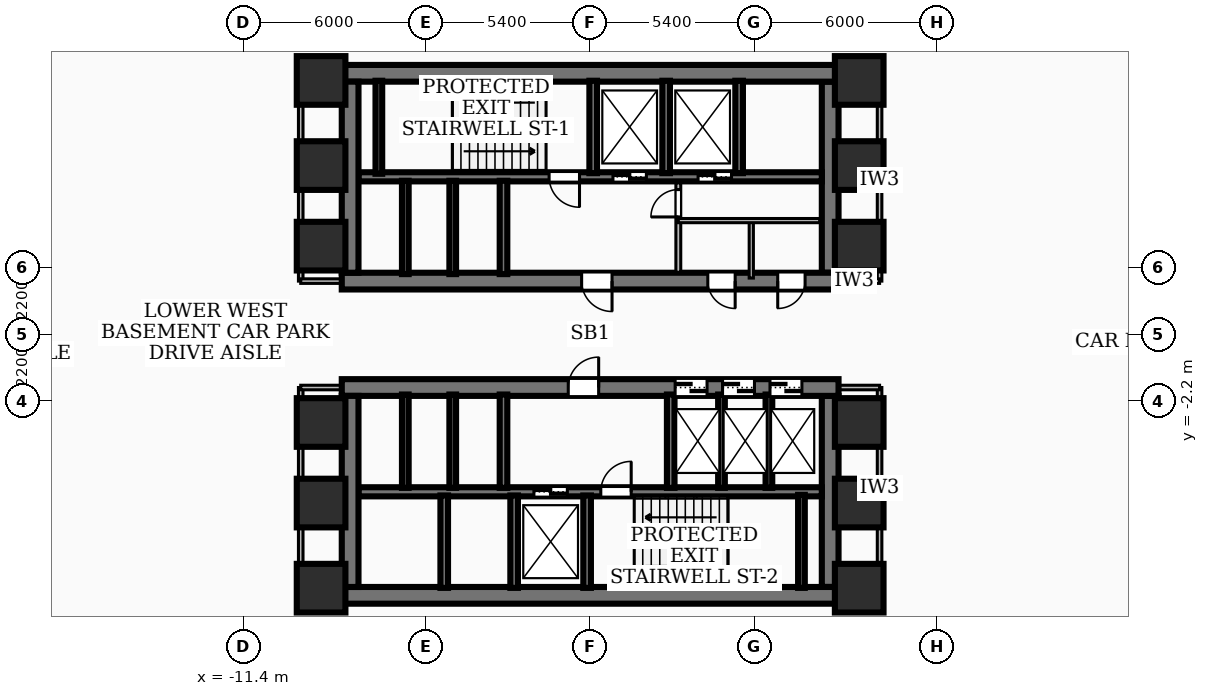
"""IFC4 building model, lengths in metres.
Left out: names, types, materials, properties, quantities, classifications, styles, units other than length and angle.
Written with IfcOpenShell. Run it as: python <this file> out.ifc"""

import sys

from ifc_helpers import new_model, si_unit, direction, frame, frame_2d, origin, origin_2d, place, context, subcontext, project, spatial, rectangle, extrude, element, fill, save


model = new_model("IFC4")
c1 = context("Model", 3, precision=1e-05, world=origin(), true_north=direction((0.0, 1.0)))
c2 = subcontext(c1, "Body", "Model", "MODEL_VIEW")
j1 = project(units=[si_unit("LENGTHUNIT", "METRE"), si_unit("PLANEANGLEUNIT", "RADIAN")], contexts=[c1])
p1 = place(None, origin())
s1 = spatial("IfcSite", under=j1, at=p1, CompositionType="ELEMENT")
p2 = place(p1, origin())
s2 = spatial("IfcBuilding", under=s1, at=p2, CompositionType="ELEMENT")
p3 = place(p2, frame((0.0, 0.0, -9.0)))
s3 = spatial("IfcBuildingStorey", under=s2, at=p3, CompositionType="ELEMENT", Elevation=-9.0)
p4 = place(p3, frame((-8.78, 8.585, 0.0), z_axis=(0.0, 0.0, 1.0), x_axis=(1.0, 0.0, 0.0)))
e1 = element("IfcWall", 1, at=p4, inside=s3, PredefinedType="SHEAR", context=c2, shape_type="SweptSolid", body=[
    extrude(rectangle(XDim=17.56, YDim=0.55, at=frame_2d((8.78, 0.0))), origin(), (0.0, 0.0, 1.0), 4.18),
])
p5 = place(p3, frame((8.17, 1.75, 0.0), z_axis=(0.0, 0.0, 1.0), x_axis=(-1.0, 0.0, 0.0)))
e2 = element("IfcWall", 2, at=p5, inside=s3, PredefinedType="SHEAR", context=c2, shape_type="SweptSolid", body=[
    extrude(rectangle(XDim=16.34, YDim=0.55, at=frame_2d((8.17, 0.0))), origin(), (0.0, 0.0, 1.0), 4.18),
])
p6 = place(p5, frame((7.45, 0.0, 0.0)))
e3 = element("IfcOpeningElement", 3, at=p6, cuts=e2, PredefinedType="OPENING", context=c2, shape_type="SweptSolid", body=[
    extrude(rectangle(XDim=1.0, YDim=2.1, at=frame_2d((0.5, 1.05))), frame((0.0, 0.285, 0.0), z_axis=(0.0, -1.0, 0.0), x_axis=(1.0, 0.0, 0.0)), (0.0, 0.0, 1.0), 0.57),
])
p7 = place(p5, frame((3.4, 0.0, 0.0)))
e4 = element("IfcOpeningElement", 4, at=p7, cuts=e2, PredefinedType="OPENING", context=c2, shape_type="SweptSolid", body=[
    extrude(rectangle(XDim=0.9, YDim=2.06, at=frame_2d((0.45, 1.03))), frame((0.0, 0.285, 0.0), z_axis=(0.0, -1.0, 0.0), x_axis=(1.0, 0.0, 0.0)), (0.0, 0.0, 1.0), 0.57),
])
p8 = place(p5, frame((1.1, 0.0, 0.0)))
e5 = element("IfcOpeningElement", 5, at=p8, cuts=e2, PredefinedType="OPENING", context=c2, shape_type="SweptSolid", body=[
    extrude(rectangle(XDim=0.9, YDim=2.06, at=frame_2d((0.45, 1.03))), frame((0.0, 0.285, 0.0), z_axis=(0.0, -1.0, 0.0), x_axis=(1.0, 0.0, 0.0)), (0.0, 0.0, 1.0), 0.57),
])
for number, where, z_axis, x_axis in (
    (6, (-7.895, 2.025, 0.0), (0.0, 0.0, 1.0), (0.0, 1.0, 0.0)),
    (7, (7.895, 8.31, 0.0), (0.0, 0.0, 1.0), (0.0, -1.0, 0.0)),
):
    element("IfcWall", number, at=place(p3, frame(where, z_axis=z_axis, x_axis=x_axis)), inside=s3, PredefinedType="SHEAR", context=c2, shape_type="SweptSolid", body=[
        extrude(rectangle(XDim=6.285, YDim=0.55, at=frame_2d((3.143, 0.0))), origin(), (0.0, 0.0, 1.0), 4.18),
    ])
p9 = place(p3, frame((7.62, 5.18, 0.0), z_axis=(0.0, 0.0, 1.0), x_axis=(-1.0, 0.0, 0.0)))
e8 = element("IfcWall", 8, at=p9, inside=s3, PredefinedType="SOLIDWALL", context=c2, shape_type="SweptSolid", body=[
    extrude(rectangle(XDim=15.24, YDim=0.3, at=frame_2d((7.62, 0.0))), origin(), (0.0, 0.0, 1.0), 4.18),
])
p10 = place(p9, frame((5.77, 0.0, 0.0)))
e9 = element("IfcOpeningElement", 9, at=p10, cuts=e8, PredefinedType="OPENING", context=c2, shape_type="SweptSolid", body=[
    extrude(rectangle(XDim=1.1, YDim=2.15, at=frame_2d((0.55, 1.075))), frame((0.0, 0.16, 0.0), z_axis=(0.0, -1.0, 0.0), x_axis=(1.0, 0.0, 0.0)), (0.0, 0.0, 1.0), 0.32),
])
p11 = place(p9, frame((2.97, 0.0, 0.0)))
e10 = element("IfcOpeningElement", 10, at=p11, cuts=e8, PredefinedType="OPENING", context=c2, shape_type="SweptSolid", body=[
    extrude(rectangle(XDim=1.1, YDim=2.15, at=frame_2d((0.55, 1.075))), frame((0.0, 0.16, 0.0), z_axis=(0.0, -1.0, 0.0), x_axis=(1.0, 0.0, 0.0)), (0.0, 0.0, 1.0), 0.32),
])
p12 = place(p9, frame((7.97, 0.0, 0.0)))
e11 = element("IfcOpeningElement", 11, at=p12, cuts=e8, PredefinedType="OPENING", context=c2, shape_type="SweptSolid", body=[
    extrude(rectangle(XDim=1.0, YDim=2.1, at=frame_2d((0.5, 1.05))), frame((0.0, 0.16, 0.0), z_axis=(0.0, -1.0, 0.0), x_axis=(1.0, 0.0, 0.0)), (0.0, 0.0, 1.0), 0.32),
])
p13 = place(p3, frame((8.78, -8.585, 0.0), z_axis=(0.0, 0.0, 1.0), x_axis=(-1.0, 0.0, 0.0)))
e12 = element("IfcWall", 12, at=p13, inside=s3, PredefinedType="SHEAR", context=c2, shape_type="SweptSolid", body=[
    extrude(rectangle(XDim=17.56, YDim=0.55, at=frame_2d((8.78, 0.0))), origin(), (0.0, 0.0, 1.0), 4.18),
])
p14 = place(p3, frame((-8.17, -1.75, 0.0), z_axis=(0.0, 0.0, 1.0), x_axis=(1.0, 0.0, 0.0)))
e13 = element("IfcWall", 13, at=p14, inside=s3, PredefinedType="SHEAR", context=c2, shape_type="SweptSolid", body=[
    extrude(rectangle(XDim=16.34, YDim=0.55, at=frame_2d((8.17, 0.0))), origin(), (0.0, 0.0, 1.0), 4.18),
])
p15 = place(p14, frame((7.45, 0.0, 0.0)))
e14 = element("IfcOpeningElement", 14, at=p15, cuts=e13, PredefinedType="OPENING", context=c2, shape_type="SweptSolid", body=[
    extrude(rectangle(XDim=1.0, YDim=2.1, at=frame_2d((0.5, 1.05))), frame((0.0, 0.285, 0.0), z_axis=(0.0, -1.0, 0.0), x_axis=(1.0, 0.0, 0.0)), (0.0, 0.0, 1.0), 0.57),
])
p16 = place(p14, frame((10.965, 0.0, 0.0)))
e15 = element("IfcOpeningElement", 15, at=p16, cuts=e13, PredefinedType="OPENING", context=c2, shape_type="SweptSolid", body=[
    extrude(rectangle(XDim=1.05, YDim=2.15, at=frame_2d((0.525, 1.075))), frame((0.0, 0.285, 0.0), z_axis=(0.0, -1.0, 0.0), x_axis=(1.0, 0.0, 0.0)), (0.0, 0.0, 1.0), 0.57),
])
p17 = place(p14, frame((12.525, 0.0, 0.0)))
e16 = element("IfcOpeningElement", 16, at=p17, cuts=e13, PredefinedType="OPENING", context=c2, shape_type="SweptSolid", body=[
    extrude(rectangle(XDim=1.05, YDim=2.15, at=frame_2d((0.525, 1.075))), frame((0.0, 0.285, 0.0), z_axis=(0.0, -1.0, 0.0), x_axis=(1.0, 0.0, 0.0)), (0.0, 0.0, 1.0), 0.57),
])
p18 = place(p14, frame((14.085, 0.0, 0.0)))
e17 = element("IfcOpeningElement", 17, at=p18, cuts=e13, PredefinedType="OPENING", context=c2, shape_type="SweptSolid", body=[
    extrude(rectangle(XDim=1.05, YDim=2.15, at=frame_2d((0.525, 1.075))), frame((0.0, 0.285, 0.0), z_axis=(0.0, -1.0, 0.0), x_axis=(1.0, 0.0, 0.0)), (0.0, 0.0, 1.0), 0.57),
])
for number, where, z_axis, x_axis in (
    (18, (-7.895, -8.31, 0.0), (0.0, 0.0, 1.0), (0.0, 1.0, 0.0)),
    (19, (7.895, -2.025, 0.0), (0.0, 0.0, 1.0), (0.0, -1.0, 0.0)),
):
    element("IfcWall", number, at=place(p3, frame(where, z_axis=z_axis, x_axis=x_axis)), inside=s3, PredefinedType="SHEAR", context=c2, shape_type="SweptSolid", body=[
        extrude(rectangle(XDim=6.285, YDim=0.55, at=frame_2d((3.143, 0.0))), origin(), (0.0, 0.0, 1.0), 4.18),
    ])
p19 = place(p3, frame((-7.62, -5.18, 0.0), z_axis=(0.0, 0.0, 1.0), x_axis=(1.0, 0.0, 0.0)))
e20 = element("IfcWall", 20, at=p19, inside=s3, PredefinedType="SOLIDWALL", context=c2, shape_type="SweptSolid", body=[
    extrude(rectangle(XDim=15.24, YDim=0.3, at=frame_2d((7.62, 0.0))), origin(), (0.0, 0.0, 1.0), 4.18),
])
p20 = place(p19, frame((5.77, 0.0, 0.0)))
e21 = element("IfcOpeningElement", 21, at=p20, cuts=e20, PredefinedType="OPENING", context=c2, shape_type="SweptSolid", body=[
    extrude(rectangle(XDim=1.1, YDim=2.15, at=frame_2d((0.55, 1.075))), frame((0.0, 0.16, 0.0), z_axis=(0.0, -1.0, 0.0), x_axis=(1.0, 0.0, 0.0)), (0.0, 0.0, 1.0), 0.32),
])
p21 = place(p19, frame((7.97, 0.0, 0.0)))
e22 = element("IfcOpeningElement", 22, at=p21, cuts=e20, PredefinedType="OPENING", context=c2, shape_type="SweptSolid", body=[
    extrude(rectangle(XDim=1.0, YDim=2.1, at=frame_2d((0.5, 1.05))), frame((0.0, 0.16, 0.0), z_axis=(0.0, -1.0, 0.0), x_axis=(1.0, 0.0, 0.0)), (0.0, 0.0, 1.0), 0.32),
])
for number, where, z_axis, x_axis in (
    (23, (-6.95, 5.28, 0.0), (0.0, 0.0, 1.0), (0.0, 1.0, 0.0)),
    (24, (6.95, -8.34, 0.0), (0.0, 0.0, 1.0), (0.0, 1.0, 0.0)),
):
    element("IfcWall", number, at=place(p3, frame(where, z_axis=z_axis, x_axis=x_axis)), inside=s3, PredefinedType="SOLIDWALL", context=c2, shape_type="SweptSolid", body=[
        extrude(rectangle(XDim=3.06, YDim=0.22, at=frame_2d((1.53, 0.0))), origin(), (0.0, 0.0, 1.0), 4.18),
    ])
for number, where, z_axis, x_axis in (
    (25, (0.1, 5.3, 0.0), (0.0, 0.0, 1.0), (0.0, 1.0, 0.0)),
    (26, (2.5, 5.3, 0.0), (0.0, 0.0, 1.0), (0.0, 1.0, 0.0)),
    (27, (4.9, 5.3, 0.0), (0.0, 0.0, 1.0), (0.0, 1.0, 0.0)),
):
    element("IfcWall", number, at=place(p3, frame(where, z_axis=z_axis, x_axis=x_axis)), inside=s3, PredefinedType="SOLIDWALL", context=c2, shape_type="SweptSolid", body=[
        extrude(rectangle(XDim=3.04, YDim=0.25, at=frame_2d((1.52, 0.0))), origin(), (0.0, 0.0, 1.0), 4.18),
    ])
p22 = place(p3, frame((-2.85, 1.98, 0.0), z_axis=(0.0, 0.0, 1.0), x_axis=(0.0, 1.0, 0.0)))
e28 = element("IfcWall", 28, at=p22, inside=s3, PredefinedType="SOLIDWALL", context=c2, shape_type="SweptSolid", body=[
    extrude(rectangle(XDim=3.07, YDim=0.25, at=frame_2d((1.535, 0.0))), origin(), (0.0, 0.0, 1.0), 4.18),
])
for number, where, z_axis, x_axis in (
    (29, (-0.1, -8.34, 0.0), (0.0, 0.0, 1.0), (0.0, 1.0, 0.0)),
    (30, (-2.5, -8.34, 0.0), (0.0, 0.0, 1.0), (0.0, 1.0, 0.0)),
    (31, (-4.8, -8.34, 0.0), (0.0, 0.0, 1.0), (0.0, 1.0, 0.0)),
):
    element("IfcWall", number, at=place(p3, frame(where, z_axis=z_axis, x_axis=x_axis)), inside=s3, PredefinedType="SOLIDWALL", context=c2, shape_type="SweptSolid", body=[
        extrude(rectangle(XDim=3.04, YDim=0.25, at=frame_2d((1.52, 0.0))), origin(), (0.0, 0.0, 1.0), 4.18),
    ])
for number, where, z_axis, x_axis in (
    (32, (-2.85, -5.05, 0.0), (0.0, 0.0, 1.0), (0.0, 1.0, 0.0)),
    (33, (2.65, -5.05, 0.0), (0.0, 0.0, 1.0), (0.0, 1.0, 0.0)),
):
    element("IfcWall", number, at=place(p3, frame(where, z_axis=z_axis, x_axis=x_axis)), inside=s3, PredefinedType="SOLIDWALL", context=c2, shape_type="SweptSolid", body=[
        extrude(rectangle(XDim=3.07, YDim=0.25, at=frame_2d((1.535, 0.0))), origin(), (0.0, 0.0, 1.0), 4.18),
    ])
for number, where, z_axis, x_axis in (
    (34, (-6.08, 1.98, 0.0), (0.0, 0.0, 1.0), (0.0, 1.0, 0.0)),
    (35, (-4.52, 1.98, 0.0), (0.0, 0.0, 1.0), (0.0, 1.0, 0.0)),
    (36, (4.32, -5.05, 0.0), (0.0, 0.0, 1.0), (0.0, 1.0, 0.0)),
    (37, (5.88, -5.05, 0.0), (0.0, 0.0, 1.0), (0.0, 1.0, 0.0)),
    (38, (-6.08, -5.05, 0.0), (0.0, 0.0, 1.0), (0.0, 1.0, 0.0)),
    (39, (-4.52, -5.05, 0.0), (0.0, 0.0, 1.0), (0.0, 1.0, 0.0)),
):
    element("IfcWall", number, at=place(p3, frame(where, z_axis=z_axis, x_axis=x_axis)), inside=s3, PredefinedType="SOLIDWALL", context=c2, shape_type="SweptSolid", body=[
        extrude(rectangle(XDim=3.07, YDim=0.22, at=frame_2d((1.535, 0.0))), origin(), (0.0, 0.0, 1.0), 4.18),
    ])
for number, where, z_axis, x_axis in (
    (40, (-8.85, -5.55, 0.0), (0.0, 0.0, 1.0), (1.0, 0.0, 0.0)),
    (41, (-8.85, -2.9, 0.0), (0.0, 0.0, 1.0), (1.0, 0.0, 0.0)),
    (42, (-8.85, 2.9, 0.0), (0.0, 0.0, 1.0), (1.0, 0.0, 0.0)),
    (43, (-8.85, 5.55, 0.0), (0.0, 0.0, 1.0), (1.0, 0.0, 0.0)),
    (44, (8.85, -5.55, 0.0), (0.0, 0.0, 1.0), (1.0, 0.0, 0.0)),
    (45, (8.85, -2.9, 0.0), (0.0, 0.0, 1.0), (1.0, 0.0, 0.0)),
    (46, (8.85, 2.9, 0.0), (0.0, 0.0, 1.0), (1.0, 0.0, 0.0)),
    (47, (8.85, 5.55, 0.0), (0.0, 0.0, 1.0), (1.0, 0.0, 0.0)),
    (48, (-8.85, 8.35, 0.0), (0.0, 0.0, 1.0), (1.0, 0.0, 0.0)),
    (49, (8.85, -8.35, 0.0), (0.0, 0.0, 1.0), (1.0, 0.0, 0.0)),
    (50, (8.85, 8.35, 0.0), (0.0, 0.0, 1.0), (1.0, 0.0, 0.0)),
    (51, (-8.85, -8.35, 0.0), (0.0, 0.0, 1.0), (1.0, 0.0, 0.0)),
):
    element("IfcColumn", number, at=place(p3, frame(where, z_axis=z_axis, x_axis=x_axis)), inside=s3, PredefinedType="COLUMN", context=c2, shape_type="SweptSolid", body=[
        extrude(rectangle(XDim=1.6, YDim=1.6, at=origin_2d()), origin(), (0.0, 0.0, 1.0), 4.5),
    ])
p23 = place(p3, frame((2.9, 2.04, 0.0), z_axis=(0.0, 0.0, 1.0), x_axis=(0.0, 1.0, 0.0)))
e52 = element("IfcWall", 52, at=p23, inside=s3, PredefinedType="PARTITIONING", context=c2, shape_type="SweptSolid", body=[
    extrude(rectangle(XDim=2.94, YDim=0.16, at=frame_2d((1.47, 0.0))), origin(), (0.0, 0.0, 1.0), 3.245),
])
p24 = place(p23, frame((1.82, 0.0, 0.0)))
e53 = element("IfcOpeningElement", 53, at=p24, cuts=e52, PredefinedType="OPENING", context=c2, shape_type="SweptSolid", body=[
    extrude(rectangle(XDim=0.9, YDim=2.06, at=frame_2d((0.45, 1.03))), frame((0.0, 0.09, 0.0), z_axis=(0.0, -1.0, 0.0), x_axis=(1.0, 0.0, 0.0)), (0.0, 0.0, 1.0), 0.18),
])
p25 = place(p3, frame((2.9, 3.74, 0.0), z_axis=(0.0, 0.0, 1.0), x_axis=(1.0, 0.0, 0.0)))
e54 = element("IfcWall", 54, at=p25, inside=s3, PredefinedType="PARTITIONING", context=c2, shape_type="SweptSolid", body=[
    extrude(rectangle(XDim=4.65, YDim=0.138, at=frame_2d((2.325, 0.0))), origin(), (0.0, 0.0, 1.0), 4.18),
])
p26 = place(p3, frame((5.3, 1.85, 0.0), z_axis=(0.0, 0.0, 1.0), x_axis=(0.0, 1.0, 0.0)))
e55 = element("IfcWall", 55, at=p26, inside=s3, PredefinedType="PARTITIONING", context=c2, shape_type="SweptSolid", body=[
    extrude(rectangle(XDim=1.89, YDim=0.138, at=frame_2d((0.945, 0.0))), origin(), (0.0, 0.0, 1.0), 3.245),
])
p27 = place(p3, frame((-9.52, 1.75, 0.0), z_axis=(0.0, 0.0, 1.0), x_axis=(0.0, 1.0, 0.0)))
e56 = element("IfcWall", 56, at=p27, inside=s3, PredefinedType="PARTITIONING", context=c2, shape_type="SweptSolid", body=[
    extrude(rectangle(XDim=6.63, YDim=0.15, at=frame_2d((3.315, 0.0))), origin(), (0.0, 0.0, 1.0), 3.072),
])
p28 = place(p3, frame((-7.85, 1.75, 0.0), z_axis=(0.0, 0.0, 1.0), x_axis=(-1.0, 0.0, 0.0)))
e57 = element("IfcWall", 57, at=p28, inside=s3, PredefinedType="PARTITIONING", context=c2, shape_type="SweptSolid", body=[
    extrude(rectangle(XDim=1.67, YDim=0.15, at=frame_2d((0.835, 0.0))), origin(), (0.0, 0.0, 1.0), 3.245),
])
p29 = place(p3, frame((-9.52, -8.38, 0.0), z_axis=(0.0, 0.0, 1.0), x_axis=(0.0, 1.0, 0.0)))
e58 = element("IfcWall", 58, at=p29, inside=s3, PredefinedType="PARTITIONING", context=c2, shape_type="SweptSolid", body=[
    extrude(rectangle(XDim=6.63, YDim=0.15, at=frame_2d((3.315, 0.0))), origin(), (0.0, 0.0, 1.0), 3.072),
])
p30 = place(p3, frame((-7.85, -1.75, 0.0), z_axis=(0.0, 0.0, 1.0), x_axis=(-1.0, 0.0, 0.0)))
e59 = element("IfcWall", 59, at=p30, inside=s3, PredefinedType="PARTITIONING", context=c2, shape_type="SweptSolid", body=[
    extrude(rectangle(XDim=1.67, YDim=0.15, at=frame_2d((0.835, 0.0))), origin(), (0.0, 0.0, 1.0), 3.245),
])
p31 = place(p3, frame((9.52, 1.75, 0.0), z_axis=(0.0, 0.0, 1.0), x_axis=(0.0, 1.0, 0.0)))
e60 = element("IfcWall", 60, at=p31, inside=s3, PredefinedType="PARTITIONING", context=c2, shape_type="SweptSolid", body=[
    extrude(rectangle(XDim=6.63, YDim=0.15, at=frame_2d((3.315, 0.0))), origin(), (0.0, 0.0, 1.0), 3.072),
])
p32 = place(p3, frame((7.85, 1.75, 0.0), z_axis=(0.0, 0.0, 1.0), x_axis=(1.0, 0.0, 0.0)))
e61 = element("IfcWall", 61, at=p32, inside=s3, PredefinedType="PARTITIONING", context=c2, shape_type="SweptSolid", body=[
    extrude(rectangle(XDim=1.67, YDim=0.15, at=frame_2d((0.835, 0.0))), origin(), (0.0, 0.0, 1.0), 3.245),
])
p33 = place(p3, frame((9.52, -8.38, 0.0), z_axis=(0.0, 0.0, 1.0), x_axis=(0.0, 1.0, 0.0)))
e62 = element("IfcWall", 62, at=p33, inside=s3, PredefinedType="PARTITIONING", context=c2, shape_type="SweptSolid", body=[
    extrude(rectangle(XDim=6.63, YDim=0.15, at=frame_2d((3.315, 0.0))), origin(), (0.0, 0.0, 1.0), 3.072),
])
p34 = place(p3, frame((7.85, -1.75, 0.0), z_axis=(0.0, 0.0, 1.0), x_axis=(1.0, 0.0, 0.0)))
e63 = element("IfcWall", 63, at=p34, inside=s3, PredefinedType="PARTITIONING", context=c2, shape_type="SweptSolid", body=[
    extrude(rectangle(XDim=1.67, YDim=0.15, at=frame_2d((0.835, 0.0))), origin(), (0.0, 0.0, 1.0), 3.245),
])
p35 = place(p6, origin())
e64 = element("IfcDoor", 64, at=p35, inside=s3, OperationType="SINGLE_SWING_LEFT", PredefinedType="DOOR", context=c2, shape_type="SweptSolid", body=[
    extrude(rectangle(XDim=1.0, YDim=2.1, at=frame_2d((0.5, 1.05))), frame((0.0, 0.025, 0.0), z_axis=(0.0, -1.0, 0.0), x_axis=(1.0, 0.0, 0.0)), (0.0, 0.0, 1.0), 0.05),
])
fill(e3, e64)
p36 = place(p15, origin())
e65 = element("IfcDoor", 65, at=p36, inside=s3, OperationType="SINGLE_SWING_RIGHT", PredefinedType="DOOR", context=c2, shape_type="SweptSolid", body=[
    extrude(rectangle(XDim=1.0, YDim=2.1, at=frame_2d((0.5, 1.05))), frame((0.0, 0.025, 0.0), z_axis=(0.0, -1.0, 0.0), x_axis=(1.0, 0.0, 0.0)), (0.0, 0.0, 1.0), 0.05),
])
fill(e14, e65)
p37 = place(p10, origin())
e66 = element("IfcDoor", 66, at=p37, inside=s3, OperationType="DOUBLE_DOOR_SLIDING", PredefinedType="DOOR", context=c2, shape_type="SweptSolid", body=[
    extrude(rectangle(XDim=1.1, YDim=2.15, at=frame_2d((0.55, 1.075))), frame((0.0, 0.025, 0.0), z_axis=(0.0, -1.0, 0.0), x_axis=(1.0, 0.0, 0.0)), (0.0, 0.0, 1.0), 0.05),
])
fill(e9, e66)
p38 = place(p11, origin())
e67 = element("IfcDoor", 67, at=p38, inside=s3, OperationType="DOUBLE_DOOR_SLIDING", PredefinedType="DOOR", context=c2, shape_type="SweptSolid", body=[
    extrude(rectangle(XDim=1.1, YDim=2.15, at=frame_2d((0.55, 1.075))), frame((0.0, 0.025, 0.0), z_axis=(0.0, -1.0, 0.0), x_axis=(1.0, 0.0, 0.0)), (0.0, 0.0, 1.0), 0.05),
])
fill(e10, e67)
p39 = place(p12, origin())
e68 = element("IfcDoor", 68, at=p39, inside=s3, OperationType="SINGLE_SWING_LEFT", PredefinedType="DOOR", context=c2, shape_type="SweptSolid", body=[
    extrude(rectangle(XDim=1.0, YDim=2.1, at=frame_2d((0.5, 1.05))), frame((0.0, 0.025, 0.0), z_axis=(0.0, -1.0, 0.0), x_axis=(1.0, 0.0, 0.0)), (0.0, 0.0, 1.0), 0.05),
])
fill(e11, e68)
p40 = place(p20, origin())
e69 = element("IfcDoor", 69, at=p40, inside=s3, OperationType="DOUBLE_DOOR_SLIDING", PredefinedType="DOOR", context=c2, shape_type="SweptSolid", body=[
    extrude(rectangle(XDim=1.1, YDim=2.15, at=frame_2d((0.55, 1.075))), frame((0.0, 0.025, 0.0), z_axis=(0.0, -1.0, 0.0), x_axis=(1.0, 0.0, 0.0)), (0.0, 0.0, 1.0), 0.05),
])
fill(e21, e69)
p41 = place(p21, origin())
e70 = element("IfcDoor", 70, at=p41, inside=s3, OperationType="SINGLE_SWING_RIGHT", PredefinedType="DOOR", context=c2, shape_type="SweptSolid", body=[
    extrude(rectangle(XDim=1.0, YDim=2.1, at=frame_2d((0.5, 1.05))), frame((0.0, 0.025, 0.0), z_axis=(0.0, -1.0, 0.0), x_axis=(1.0, 0.0, 0.0)), (0.0, 0.0, 1.0), 0.05),
])
fill(e22, e70)
p42 = place(p16, origin())
e71 = element("IfcDoor", 71, at=p42, inside=s3, OperationType="DOUBLE_DOOR_SLIDING", PredefinedType="DOOR", context=c2, shape_type="SweptSolid", body=[
    extrude(rectangle(XDim=1.05, YDim=2.15, at=frame_2d((0.525, 1.075))), frame((0.0, 0.025, 0.0), z_axis=(0.0, -1.0, 0.0), x_axis=(1.0, 0.0, 0.0)), (0.0, 0.0, 1.0), 0.05),
])
fill(e15, e71)
p43 = place(p17, origin())
e72 = element("IfcDoor", 72, at=p43, inside=s3, OperationType="DOUBLE_DOOR_SLIDING", PredefinedType="DOOR", context=c2, shape_type="SweptSolid", body=[
    extrude(rectangle(XDim=1.05, YDim=2.15, at=frame_2d((0.525, 1.075))), frame((0.0, 0.025, 0.0), z_axis=(0.0, -1.0, 0.0), x_axis=(1.0, 0.0, 0.0)), (0.0, 0.0, 1.0), 0.05),
])
fill(e16, e72)
p44 = place(p18, origin())
e73 = element("IfcDoor", 73, at=p44, inside=s3, OperationType="DOUBLE_DOOR_SLIDING", PredefinedType="DOOR", context=c2, shape_type="SweptSolid", body=[
    extrude(rectangle(XDim=1.05, YDim=2.15, at=frame_2d((0.525, 1.075))), frame((0.0, 0.025, 0.0), z_axis=(0.0, -1.0, 0.0), x_axis=(1.0, 0.0, 0.0)), (0.0, 0.0, 1.0), 0.05),
])
fill(e17, e73)
p45 = place(p7, origin())
e74 = element("IfcDoor", 74, at=p45, inside=s3, OperationType="SINGLE_SWING_LEFT", PredefinedType="DOOR", context=c2, shape_type="SweptSolid", body=[
    extrude(rectangle(XDim=0.9, YDim=2.06, at=frame_2d((0.45, 1.03))), frame((0.0, 0.025, 0.0), z_axis=(0.0, -1.0, 0.0), x_axis=(1.0, 0.0, 0.0)), (0.0, 0.0, 1.0), 0.05),
])
fill(e4, e74)
p46 = place(p8, origin())
e75 = element("IfcDoor", 75, at=p46, inside=s3, OperationType="SINGLE_SWING_RIGHT", PredefinedType="DOOR", context=c2, shape_type="SweptSolid", body=[
    extrude(rectangle(XDim=0.9, YDim=2.06, at=frame_2d((0.45, 1.03))), frame((0.0, 0.025, 0.0), z_axis=(0.0, -1.0, 0.0), x_axis=(1.0, 0.0, 0.0)), (0.0, 0.0, 1.0), 0.05),
])
fill(e5, e75)
p47 = place(p24, origin())
e76 = element("IfcDoor", 76, at=p47, inside=s3, OperationType="SINGLE_SWING_LEFT", PredefinedType="DOOR", context=c2, shape_type="SweptSolid", body=[
    extrude(rectangle(XDim=0.9, YDim=2.06, at=frame_2d((0.45, 1.03))), frame((0.0, 0.025, 0.0), z_axis=(0.0, -1.0, 0.0), x_axis=(1.0, 0.0, 0.0)), (0.0, 0.0, 1.0), 0.05),
])
fill(e53, e76)
save(model, sys.argv[1])
